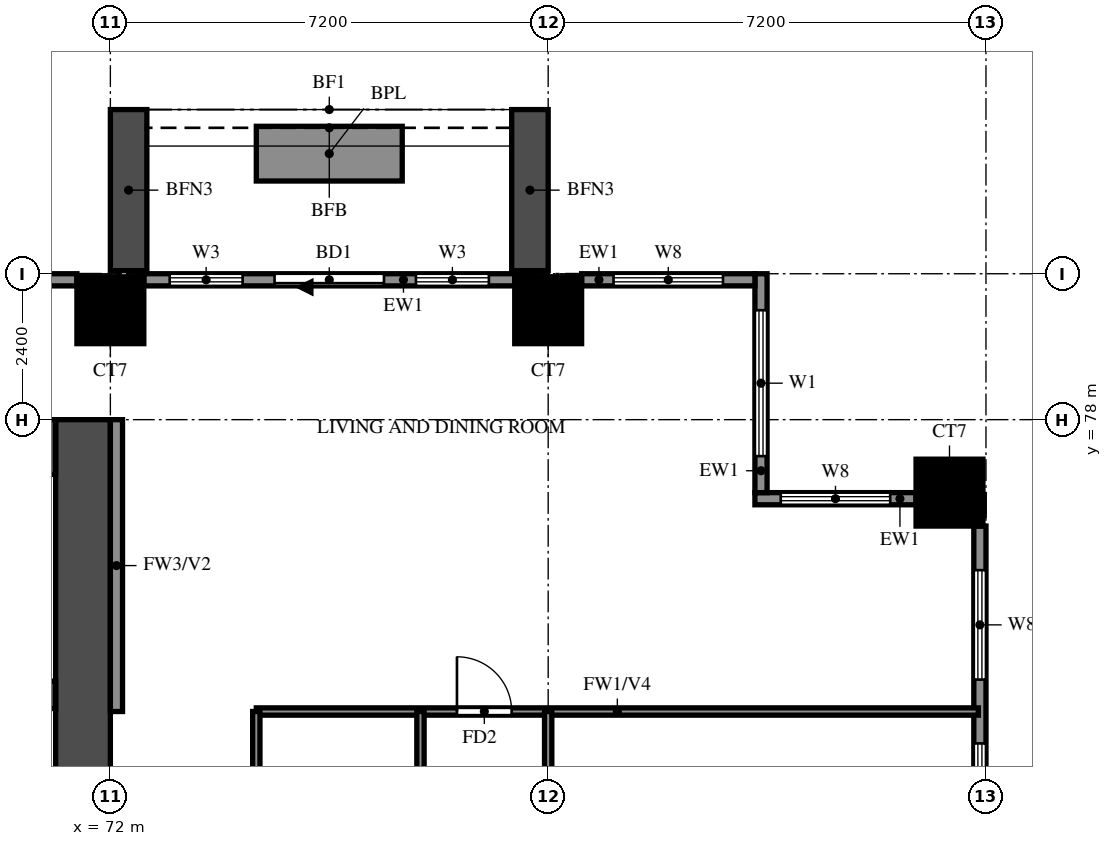
"""IFC4 building model, lengths in metres.
Left out: names, types, materials, properties, quantities, classifications, styles, units other than length and angle.
Written with IfcOpenShell. Run it as: python <this file> out.ifc"""

import sys

from ifc_helpers import new_model, si_unit, direction, frame, frame_2d, origin, origin_2d, place, context, subcontext, project, spatial, rectangle, extrude, source, transform, mapped, element, fill, save


model = new_model("IFC4")
c1 = context("Model", 3, precision=1e-05, world=origin(), true_north=direction((0.0, 1.0)))
c2 = subcontext(c1, "Body", "Model", "MODEL_VIEW")
j1 = project(units=[si_unit("LENGTHUNIT", "METRE"), si_unit("PLANEANGLEUNIT", "RADIAN")], contexts=[c1])
p1 = place(None, origin())
s1 = spatial("IfcSite", under=j1, at=p1, CompositionType="ELEMENT")
p2 = place(p1, origin())
s2 = spatial("IfcBuilding", under=s1, at=p2, CompositionType="ELEMENT")
p3 = place(p2, frame((0.0, 0.0, 44.5)))
s3 = spatial("IfcBuildingStorey", under=s2, at=p3, CompositionType="ELEMENT", Elevation=44.5)
m1 = source(origin(), c2, "Body", "SweptSolid", [
    extrude(rectangle(XDim=1.1, YDim=1.1, at=origin_2d()), origin(), (0.0, 0.0, 1.0), 3.18),
])
for number, where, z_axis, x_axis in (
    (1, (85.8, 76.8, 0.0), (0.0, 0.0, 1.0), (1.0, 0.0, 0.0)),
    (2, (72.0, 79.8, 0.0), (0.0, 0.0, 1.0), (1.0, 0.0, 0.0)),
    (3, (79.2, 79.8, 0.0), (0.0, 0.0, 1.0), (1.0, 0.0, 0.0)),
):
    element("IfcColumn", number, at=place(p3, frame(where, z_axis=z_axis, x_axis=x_axis)), inside=s3, PredefinedType="COLUMN", context=c2, shape_type="MappedRepresentation", body=[
        mapped(m1, transform((0.0, 0.0, 0.0))),
    ])
p4 = place(p3, frame((71.55, 66.0, 0.0), z_axis=(0.0, 0.0, 1.0), x_axis=(0.0, 1.0, 0.0)))
e4 = element("IfcWall", 4, at=p4, inside=s3, PredefinedType="SHEAR", context=c2, shape_type="SweptSolid", body=[
    extrude(rectangle(XDim=12.0, YDim=0.9, at=frame_2d((6.0, 0.0))), origin(), (0.0, 0.0, 1.0), 3.18),
])
p5 = place(p3, frame((29.7, 77.55, 0.0), z_axis=(0.0, 0.0, 1.0), x_axis=(1.0, 0.0, 0.0)))
e5 = element("IfcWall", 5, at=p5, inside=s3, PredefinedType="SHEAR", context=c2, shape_type="SweptSolid", body=[
    extrude(rectangle(XDim=41.4, YDim=0.9, at=frame_2d((20.7, 0.0))), origin(), (0.0, 0.0, 1.0), 3.18),
])
p6 = place(p3, frame((67.925, 73.475, 0.0), z_axis=(0.0, 0.0, 1.0), x_axis=(1.0, 0.0, 0.0)))
e6 = element("IfcWall", 6, at=p6, inside=s3, PredefinedType="SHEAR", context=c2, shape_type="SweptSolid", body=[
    extrude(rectangle(XDim=3.175, YDim=0.45, at=frame_2d((1.587, 0.0))), origin(), (0.0, 0.0, 1.0), 3.18),
])
p7 = place(p3, frame((86.3, 70.15, 0.0), z_axis=(0.0, 0.0, 1.0), x_axis=(0.0, 1.0, 0.0)))
e7 = element("IfcWall", 7, at=p7, inside=s3, PredefinedType="SOLIDWALL", context=c2, shape_type="SweptSolid", body=[
    extrude(rectangle(XDim=6.1, YDim=0.2, at=frame_2d((3.05, 0.0))), origin(), (0.0, 0.0, 1.0), 3.18),
])
p8 = place(p7, frame((0.725, 0.0, 0.6)))
e8 = element("IfcOpeningElement", 8, at=p8, cuts=e7, PredefinedType="OPENING", context=c2, shape_type="SweptSolid", body=[
    extrude(rectangle(XDim=1.8, YDim=2.4, at=frame_2d((0.9, 1.2))), frame((0.0, 0.11, 0.0), z_axis=(0.0, -1.0, 0.0), x_axis=(1.0, 0.0, 0.0)), (0.0, 0.0, 1.0), 0.22),
])
p9 = place(p7, frame((3.575, 0.0, 0.6)))
e9 = element("IfcOpeningElement", 9, at=p9, cuts=e7, PredefinedType="OPENING", context=c2, shape_type="SweptSolid", body=[
    extrude(rectangle(XDim=1.8, YDim=2.4, at=frame_2d((0.9, 1.2))), frame((0.0, 0.11, 0.0), z_axis=(0.0, -1.0, 0.0), x_axis=(1.0, 0.0, 0.0)), (0.0, 0.0, 1.0), 0.22),
])
p10 = place(p3, frame((85.25, 76.7, 0.0), z_axis=(0.0, 0.0, 1.0), x_axis=(-1.0, 0.0, 0.0)))
e10 = element("IfcWall", 10, at=p10, inside=s3, PredefinedType="SOLIDWALL", context=c2, shape_type="SweptSolid", body=[
    extrude(rectangle(XDim=2.65, YDim=0.2, at=frame_2d((1.325, 0.0))), origin(), (0.0, 0.0, 1.0), 3.18),
])
p11 = place(p10, frame((0.425, 0.0, 0.6)))
e11 = element("IfcOpeningElement", 11, at=p11, cuts=e10, PredefinedType="OPENING", context=c2, shape_type="SweptSolid", body=[
    extrude(rectangle(XDim=1.8, YDim=2.4, at=frame_2d((0.9, 1.2))), frame((0.0, 0.11, 0.0), z_axis=(0.0, -1.0, 0.0), x_axis=(1.0, 0.0, 0.0)), (0.0, 0.0, 1.0), 0.22),
])
p12 = place(p3, frame((82.7, 76.8, 0.0), z_axis=(0.0, 0.0, 1.0), x_axis=(0.0, 1.0, 0.0)))
e12 = element("IfcWall", 12, at=p12, inside=s3, PredefinedType="SOLIDWALL", context=c2, shape_type="SweptSolid", body=[
    extrude(rectangle(XDim=3.6, YDim=0.2, at=frame_2d((1.8, 0.0))), origin(), (0.0, 0.0, 1.0), 3.18),
])
p13 = place(p12, frame((0.6, 0.0, 0.6)))
e13 = element("IfcOpeningElement", 13, at=p13, cuts=e12, PredefinedType="OPENING", context=c2, shape_type="SweptSolid", body=[
    extrude(rectangle(XDim=2.4, YDim=2.4, at=frame_2d((1.2, 1.2))), frame((0.0, 0.11, 0.0), z_axis=(0.0, -1.0, 0.0), x_axis=(1.0, 0.0, 0.0)), (0.0, 0.0, 1.0), 0.22),
])
p14 = place(p3, frame((82.6, 80.3, 0.0), z_axis=(0.0, 0.0, 1.0), x_axis=(-1.0, 0.0, 0.0)))
e14 = element("IfcWall", 14, at=p14, inside=s3, PredefinedType="SOLIDWALL", context=c2, shape_type="SweptSolid", body=[
    extrude(rectangle(XDim=2.85, YDim=0.2, at=frame_2d((1.425, 0.0))), origin(), (0.0, 0.0, 1.0), 3.18),
])
p15 = place(p14, frame((0.525, 0.0, 0.6)))
e15 = element("IfcOpeningElement", 15, at=p15, cuts=e14, PredefinedType="OPENING", context=c2, shape_type="SweptSolid", body=[
    extrude(rectangle(XDim=1.8, YDim=2.4, at=frame_2d((0.9, 1.2))), frame((0.0, 0.11, 0.0), z_axis=(0.0, -1.0, 0.0), x_axis=(1.0, 0.0, 0.0)), (0.0, 0.0, 1.0), 0.22),
])
p16 = place(p3, frame((78.65, 80.3, 0.0), z_axis=(0.0, 0.0, 1.0), x_axis=(-1.0, 0.0, 0.0)))
e16 = element("IfcWall", 16, at=p16, inside=s3, PredefinedType="SOLIDWALL", context=c2, shape_type="SweptSolid", body=[
    extrude(rectangle(XDim=6.1, YDim=0.2, at=frame_2d((3.05, 0.0))), origin(), (0.0, 0.0, 1.0), 3.18),
])
p17 = place(p16, frame((2.15, 0.0, 0.0)))
e17 = element("IfcOpeningElement", 17, at=p17, cuts=e16, PredefinedType="OPENING", context=c2, shape_type="SweptSolid", body=[
    extrude(rectangle(XDim=1.8, YDim=2.4, at=frame_2d((0.9, 1.2))), frame((0.0, 0.11, 0.0), z_axis=(0.0, -1.0, 0.0), x_axis=(1.0, 0.0, 0.0)), (0.0, 0.0, 1.0), 0.22),
])
p18 = place(p16, frame((0.425, 0.0, 0.6)))
e18 = element("IfcOpeningElement", 18, at=p18, cuts=e16, PredefinedType="OPENING", context=c2, shape_type="SweptSolid", body=[
    extrude(rectangle(XDim=1.2, YDim=2.4, at=frame_2d((0.6, 1.2))), frame((0.0, 0.11, 0.0), z_axis=(0.0, -1.0, 0.0), x_axis=(1.0, 0.0, 0.0)), (0.0, 0.0, 1.0), 0.22),
])
p19 = place(p16, frame((4.475, 0.0, 0.6)))
e19 = element("IfcOpeningElement", 19, at=p19, cuts=e16, PredefinedType="OPENING", context=c2, shape_type="SweptSolid", body=[
    extrude(rectangle(XDim=1.2, YDim=2.4, at=frame_2d((0.6, 1.2))), frame((0.0, 0.11, 0.0), z_axis=(0.0, -1.0, 0.0), x_axis=(1.0, 0.0, 0.0)), (0.0, 0.0, 1.0), 0.22),
])
p20 = place(p3, frame((71.45, 80.3, 0.0), z_axis=(0.0, 0.0, 1.0), x_axis=(-1.0, 0.0, 0.0)))
e20 = element("IfcWall", 20, at=p20, inside=s3, PredefinedType="SOLIDWALL", context=c2, shape_type="SweptSolid", body=[
    extrude(rectangle(XDim=6.1, YDim=0.2, at=frame_2d((3.05, 0.0))), origin(), (0.0, 0.0, 1.0), 3.18),
])
for number, where, z_axis, x_axis in (
    (21, (78.9, 80.45, 0.0), (0.0, 0.0, 1.0), (0.0, 1.0, 0.0)),
    (22, (72.3, 80.45, 0.0), (0.0, 0.0, 1.0), (0.0, 1.0, 0.0)),
):
    element("IfcWall", number, at=place(p3, frame(where, z_axis=z_axis, x_axis=x_axis)), inside=s3, PredefinedType="SOLIDWALL", context=c2, shape_type="SweptSolid", body=[
        extrude(rectangle(XDim=2.65, YDim=0.6, at=frame_2d((1.325, 0.0))), origin(), (0.0, 0.0, 1.0), 2.85),
    ])
p21 = place(p3, frame((76.8, 82.375, 0.0), z_axis=(0.0, 0.0, 1.0), x_axis=(-1.0, 0.0, 0.0)))
e23 = element("IfcWall", 23, at=p21, inside=s3, PredefinedType="SOLIDWALL", context=c2, shape_type="SweptSolid", body=[
    extrude(rectangle(XDim=2.4, YDim=0.9, at=frame_2d((1.2, 0.0))), origin(), (0.0, 0.0, 1.0), 0.9),
])
p22 = place(p3, frame((72.1, 73.2, 0.0), z_axis=(0.0, 0.0, 1.0), x_axis=(0.0, 1.0, 0.0)))
e24 = element("IfcWall", 24, at=p22, inside=s3, PredefinedType="SOLIDWALL", context=c2, shape_type="SweptSolid", body=[
    extrude(rectangle(XDim=4.8, YDim=0.2, at=frame_2d((2.4, 0.0))), origin(), (0.0, 0.0, 1.0), 3.18),
])
p23 = place(p3, frame((74.4, 73.2, 0.0), z_axis=(0.0, 0.0, 1.0), x_axis=(1.0, 0.0, 0.0)))
e25 = element("IfcWall", 25, at=p23, inside=s3, PredefinedType="PARTITIONING", context=c2, shape_type="SweptSolid", body=[
    extrude(rectangle(XDim=11.875, YDim=0.12, at=frame_2d((5.938, 0.0))), origin(), (0.0, 0.0, 1.0), 2.28),
])
p24 = place(p23, frame((3.3, 0.0, 0.0)))
e26 = element("IfcOpeningElement", 26, at=p24, cuts=e25, PredefinedType="OPENING", context=c2, shape_type="SweptSolid", body=[
    extrude(rectangle(XDim=0.9, YDim=2.1, at=frame_2d((0.45, 1.05))), frame((0.0, 0.07, 0.0), z_axis=(0.0, -1.0, 0.0), x_axis=(1.0, 0.0, 0.0)), (0.0, 0.0, 1.0), 0.14),
])
p25 = place(p3, frame((74.4, 69.62, 0.0), z_axis=(0.0, 0.0, 1.0), x_axis=(0.0, 1.0, 0.0)))
e27 = element("IfcWall", 27, at=p25, inside=s3, PredefinedType="PARTITIONING", context=c2, shape_type="SweptSolid", body=[
    extrude(rectangle(XDim=3.58, YDim=0.12, at=frame_2d((1.79, 0.0))), origin(), (0.0, 0.0, 1.0), 3.18),
])
p26 = place(p3, frame((77.1, 64.8, 0.0), z_axis=(0.0, 0.0, 1.0), x_axis=(0.0, 1.0, 0.0)))
e28 = element("IfcWall", 28, at=p26, inside=s3, PredefinedType="PARTITIONING", context=c2, shape_type="SweptSolid", body=[
    extrude(rectangle(XDim=8.4, YDim=0.12, at=frame_2d((4.2, 0.0))), origin(), (0.0, 0.0, 1.0), 3.18),
])
p27 = place(p26, frame((1.875, 0.0, 0.0)))
e29 = element("IfcOpeningElement", 29, at=p27, cuts=e28, PredefinedType="OPENING", context=c2, shape_type="SweptSolid", body=[
    extrude(rectangle(XDim=0.9, YDim=2.1, at=frame_2d((0.45, 1.05))), frame((0.0, 0.07, 0.0), z_axis=(0.0, -1.0, 0.0), x_axis=(1.0, 0.0, 0.0)), (0.0, 0.0, 1.0), 0.14),
])
p28 = place(p26, frame((6.125, 0.0, 0.0)))
e30 = element("IfcOpeningElement", 30, at=p28, cuts=e28, PredefinedType="OPENING", context=c2, shape_type="SweptSolid", body=[
    extrude(rectangle(XDim=0.8, YDim=2.1, at=frame_2d((0.4, 1.05))), frame((0.0, 0.07, 0.0), z_axis=(0.0, -1.0, 0.0), x_axis=(1.0, 0.0, 0.0)), (0.0, 0.0, 1.0), 0.14),
])
p29 = place(p3, frame((79.2, 69.6, 0.0), z_axis=(0.0, 0.0, 1.0), x_axis=(0.0, 1.0, 0.0)))
e31 = element("IfcWall", 31, at=p29, inside=s3, PredefinedType="PARTITIONING", context=c2, shape_type="SweptSolid", body=[
    extrude(rectangle(XDim=3.6, YDim=0.12, at=frame_2d((1.8, 0.0))), origin(), (0.0, 0.0, 1.0), 3.18),
])
p30 = place(p29, frame((1.35, 0.0, 0.0)))
e32 = element("IfcOpeningElement", 32, at=p30, cuts=e31, PredefinedType="OPENING", context=c2, shape_type="SweptSolid", body=[
    extrude(rectangle(XDim=0.9, YDim=2.1, at=frame_2d((0.45, 1.05))), frame((0.0, 0.07, 0.0), z_axis=(0.0, -1.0, 0.0), x_axis=(1.0, 0.0, 0.0)), (0.0, 0.0, 1.0), 0.14),
])
p31 = place(p8, origin())
e33 = element("IfcWindow", 33, at=p31, inside=s3, PartitioningType="DOUBLE_PANEL_VERTICAL", PredefinedType="WINDOW", context=c2, shape_type="SweptSolid", body=[
    extrude(rectangle(XDim=1.8, YDim=2.4, at=frame_2d((0.9, 1.2))), frame((0.0, 0.03, 0.0), z_axis=(0.0, -1.0, 0.0), x_axis=(1.0, 0.0, 0.0)), (0.0, 0.0, 1.0), 0.06),
])
fill(e8, e33)
p32 = place(p9, origin())
e34 = element("IfcWindow", 34, at=p32, inside=s3, PartitioningType="DOUBLE_PANEL_VERTICAL", PredefinedType="WINDOW", context=c2, shape_type="SweptSolid", body=[
    extrude(rectangle(XDim=1.8, YDim=2.4, at=frame_2d((0.9, 1.2))), frame((0.0, 0.03, 0.0), z_axis=(0.0, -1.0, 0.0), x_axis=(1.0, 0.0, 0.0)), (0.0, 0.0, 1.0), 0.06),
])
fill(e9, e34)
p33 = place(p11, origin())
e35 = element("IfcWindow", 35, at=p33, inside=s3, PartitioningType="DOUBLE_PANEL_VERTICAL", PredefinedType="WINDOW", context=c2, shape_type="SweptSolid", body=[
    extrude(rectangle(XDim=1.8, YDim=2.4, at=frame_2d((0.9, 1.2))), frame((0.0, 0.03, 0.0), z_axis=(0.0, -1.0, 0.0), x_axis=(1.0, 0.0, 0.0)), (0.0, 0.0, 1.0), 0.06),
])
fill(e11, e35)
p34 = place(p13, origin())
e36 = element("IfcWindow", 36, at=p34, inside=s3, PartitioningType="DOUBLE_PANEL_VERTICAL", PredefinedType="WINDOW", context=c2, shape_type="SweptSolid", body=[
    extrude(rectangle(XDim=2.4, YDim=2.4, at=frame_2d((1.2, 1.2))), frame((0.0, 0.03, 0.0), z_axis=(0.0, -1.0, 0.0), x_axis=(1.0, 0.0, 0.0)), (0.0, 0.0, 1.0), 0.06),
])
fill(e13, e36)
p35 = place(p15, origin())
e37 = element("IfcWindow", 37, at=p35, inside=s3, PartitioningType="DOUBLE_PANEL_VERTICAL", PredefinedType="WINDOW", context=c2, shape_type="SweptSolid", body=[
    extrude(rectangle(XDim=1.8, YDim=2.4, at=frame_2d((0.9, 1.2))), frame((0.0, 0.03, 0.0), z_axis=(0.0, -1.0, 0.0), x_axis=(1.0, 0.0, 0.0)), (0.0, 0.0, 1.0), 0.06),
])
fill(e15, e37)
p36 = place(p17, origin())
e38 = element("IfcDoor", 38, at=p36, inside=s3, OperationType="DOUBLE_DOOR_SLIDING", PredefinedType="DOOR", context=c2, shape_type="SweptSolid", body=[
    extrude(rectangle(XDim=1.8, YDim=2.4, at=frame_2d((0.9, 1.2))), frame((0.0, 0.025, 0.0), z_axis=(0.0, -1.0, 0.0), x_axis=(1.0, 0.0, 0.0)), (0.0, 0.0, 1.0), 0.05),
])
fill(e17, e38)
p37 = place(p18, origin())
e39 = element("IfcWindow", 39, at=p37, inside=s3, PartitioningType="SINGLE_PANEL", PredefinedType="WINDOW", context=c2, shape_type="SweptSolid", body=[
    extrude(rectangle(XDim=1.2, YDim=2.4, at=frame_2d((0.6, 1.2))), frame((0.0, 0.03, 0.0), z_axis=(0.0, -1.0, 0.0), x_axis=(1.0, 0.0, 0.0)), (0.0, 0.0, 1.0), 0.06),
])
fill(e18, e39)
p38 = place(p19, origin())
e40 = element("IfcWindow", 40, at=p38, inside=s3, PartitioningType="SINGLE_PANEL", PredefinedType="WINDOW", context=c2, shape_type="SweptSolid", body=[
    extrude(rectangle(XDim=1.2, YDim=2.4, at=frame_2d((0.6, 1.2))), frame((0.0, 0.03, 0.0), z_axis=(0.0, -1.0, 0.0), x_axis=(1.0, 0.0, 0.0)), (0.0, 0.0, 1.0), 0.06),
])
fill(e19, e40)
p39 = place(p24, origin())
e41 = element("IfcDoor", 41, at=p39, inside=s3, OperationType="SINGLE_SWING_RIGHT", PredefinedType="DOOR", context=c2, shape_type="SweptSolid", body=[
    extrude(rectangle(XDim=0.9, YDim=2.1, at=frame_2d((0.45, 1.05))), frame((0.0, 0.025, 0.0), z_axis=(0.0, -1.0, 0.0), x_axis=(1.0, 0.0, 0.0)), (0.0, 0.0, 1.0), 0.05),
])
fill(e26, e41)
save(model, sys.argv[1])
